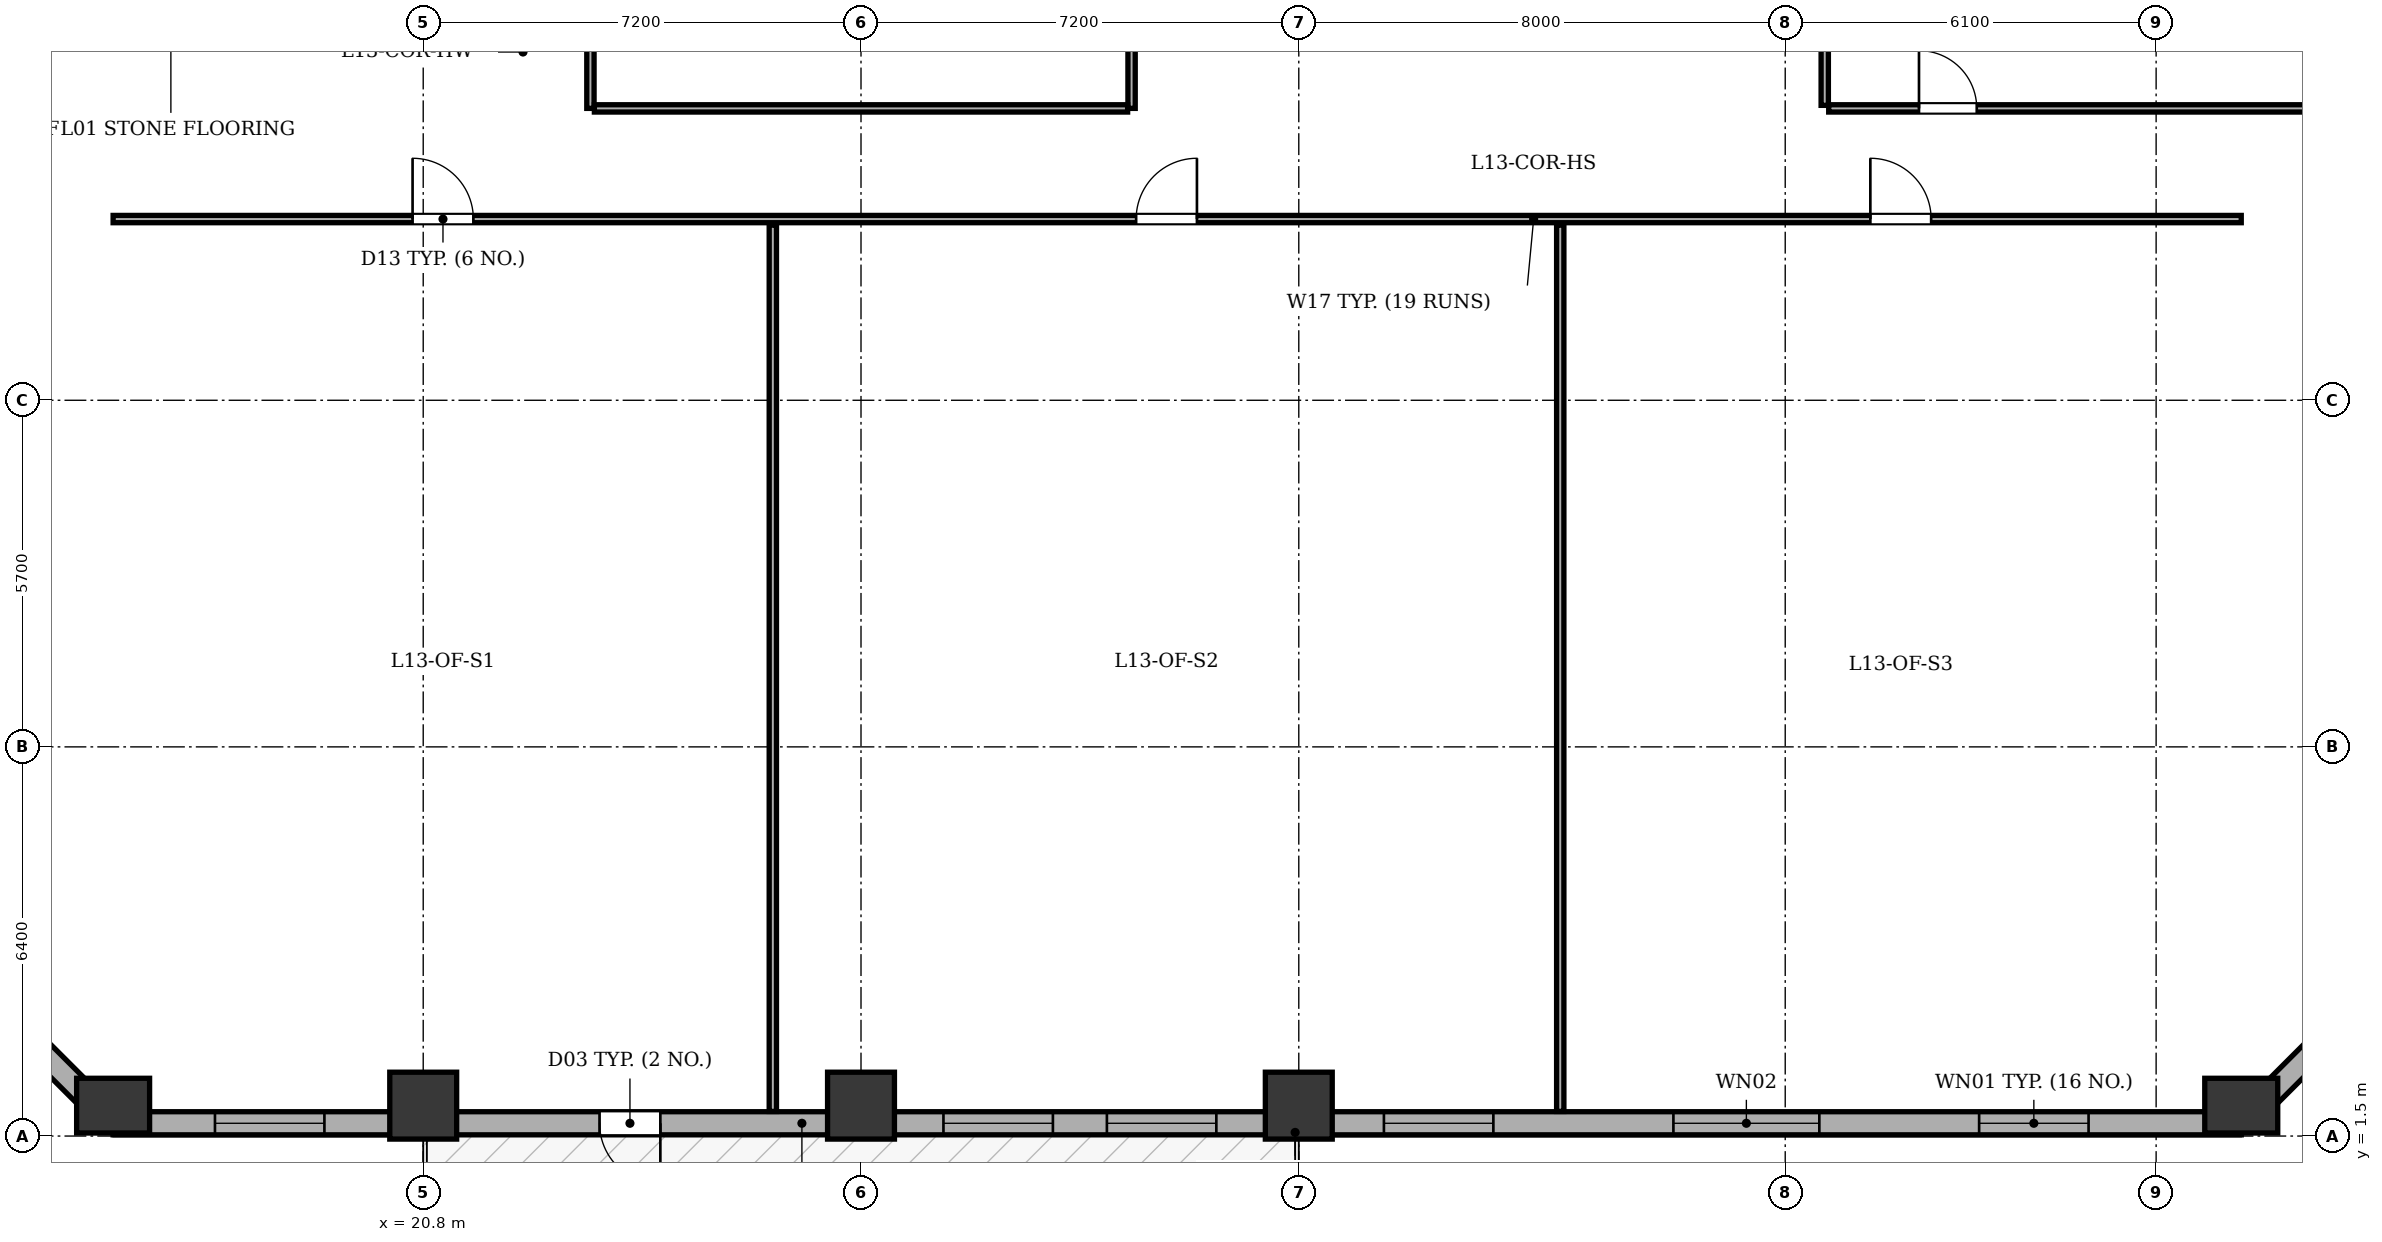
"""IFC4 building model, lengths in metres.
Left out: names, types, materials, properties, quantities, classifications, styles, units other than length and angle.
Written with IfcOpenShell. Run it as: python <this file> out.ifc"""

import sys

from ifc_helpers import new_model, si_unit, direction, frame, frame_2d, origin, origin_2d, place, context, subcontext, project, spatial, rectangle, extrude, element, fill, save


model = new_model("IFC4")
c1 = context("Model", 3, precision=1e-05, world=origin(), true_north=direction((0.0, 1.0)))
c2 = subcontext(c1, "Body", "Model", "MODEL_VIEW")
j1 = project(units=[si_unit("LENGTHUNIT", "METRE"), si_unit("PLANEANGLEUNIT", "RADIAN")], contexts=[c1])
p1 = place(None, origin())
s1 = spatial("IfcSite", under=j1, at=p1, CompositionType="ELEMENT")
p2 = place(p1, origin())
s2 = spatial("IfcBuilding", under=s1, at=p2, CompositionType="ELEMENT")
p3 = place(p2, frame((0.0, 0.0, 55.5)))
s3 = spatial("IfcBuildingStorey", under=s2, at=p3, CompositionType="ELEMENT", Elevation=55.5)
p4 = place(p3, frame((15.7, 2.0, 0.0), z_axis=(0.0, 0.0, 1.0), x_axis=(1.0, 0.0, 0.0)))
e1 = element("IfcColumn", 1, at=p4, inside=s3, PredefinedType="COLUMN", context=c2, shape_type="SweptSolid", body=[
    extrude(rectangle(XDim=0.9, YDim=1.2, at=origin_2d()), origin(), (0.0, 0.0, 1.0), 3.9),
])
for number, where, z_axis, x_axis in (
    (2, (20.8, 2.0, 0.0), (0.0, 0.0, 1.0), (1.0, 0.0, 0.0)),
    (3, (28.0, 2.0, 0.0), (0.0, 0.0, 1.0), (1.0, 0.0, 0.0)),
    (4, (35.2, 2.0, 0.0), (0.0, 0.0, 1.0), (1.0, 0.0, 0.0)),
):
    element("IfcColumn", number, at=place(p3, frame(where, z_axis=z_axis, x_axis=x_axis)), inside=s3, PredefinedType="COLUMN", context=c2, shape_type="SweptSolid", body=[
        extrude(rectangle(XDim=1.1, YDim=1.1, at=origin_2d()), origin(), (0.0, 0.0, 1.0), 3.9),
    ])
p5 = place(p3, frame((50.7, 2.0, 0.0), z_axis=(0.0, 0.0, 1.0), x_axis=(1.0, 0.0, 0.0)))
e5 = element("IfcColumn", 5, at=p5, inside=s3, PredefinedType="COLUMN", context=c2, shape_type="SweptSolid", body=[
    extrude(rectangle(XDim=0.9, YDim=1.2, at=origin_2d()), origin(), (0.0, 0.0, 1.0), 3.9),
])
p6 = place(p3, frame((50.7, 1.71, 0.0), z_axis=(0.0, 0.0, 1.0), x_axis=(-1.0, 0.0, 0.0)))
e6 = element("IfcWall", 6, at=p6, inside=s3, PredefinedType="STANDARD", context=c2, shape_type="SweptSolid", body=[
    extrude(rectangle(XDim=35.0, YDim=0.38, at=frame_2d((17.5, 0.0))), origin(), (0.0, 0.0, 1.0), 3.135),
])
p7 = place(p6, frame((26.0, 0.0, 0.0)))
e7 = element("IfcOpeningElement", 7, at=p7, cuts=e6, PredefinedType="OPENING", context=c2, shape_type="SweptSolid", body=[
    extrude(rectangle(XDim=1.0, YDim=2.02, at=frame_2d((0.5, 1.01))), frame((0.0, 0.2, 0.0), z_axis=(0.0, -1.0, 0.0), x_axis=(1.0, 0.0, 0.0)), (0.0, 0.0, 1.0), 0.4),
])
p8 = place(p6, frame((2.511, 0.0, 0.8)))
e8 = element("IfcOpeningElement", 8, at=p8, cuts=e6, PredefinedType="OPENING", context=c2, shape_type="SweptSolid", body=[
    extrude(rectangle(XDim=1.8, YDim=1.9, at=frame_2d((0.9, 0.95))), frame((0.0, 0.2, 0.0), z_axis=(0.0, -1.0, 0.0), x_axis=(1.0, 0.0, 0.0)), (0.0, 0.0, 1.0), 0.4),
])
p9 = place(p6, frame((6.939, 0.0, 0.8)))
e9 = element("IfcOpeningElement", 9, at=p9, cuts=e6, PredefinedType="OPENING", context=c2, shape_type="SweptSolid", body=[
    extrude(rectangle(XDim=2.4, YDim=1.9, at=frame_2d((1.2, 0.95))), frame((0.0, 0.2, 0.0), z_axis=(0.0, -1.0, 0.0), x_axis=(1.0, 0.0, 0.0)), (0.0, 0.0, 1.0), 0.4),
])
p10 = place(p6, frame((12.3, 0.0, 0.8)))
e10 = element("IfcOpeningElement", 10, at=p10, cuts=e6, PredefinedType="OPENING", context=c2, shape_type="SweptSolid", body=[
    extrude(rectangle(XDim=1.8, YDim=1.9, at=frame_2d((0.9, 0.95))), frame((0.0, 0.2, 0.0), z_axis=(0.0, -1.0, 0.0), x_axis=(1.0, 0.0, 0.0)), (0.0, 0.0, 1.0), 0.4),
])
p11 = place(p6, frame((16.856, 0.0, 0.8)))
e11 = element("IfcOpeningElement", 11, at=p11, cuts=e6, PredefinedType="OPENING", context=c2, shape_type="SweptSolid", body=[
    extrude(rectangle(XDim=1.8, YDim=1.9, at=frame_2d((0.9, 0.95))), frame((0.0, 0.2, 0.0), z_axis=(0.0, -1.0, 0.0), x_axis=(1.0, 0.0, 0.0)), (0.0, 0.0, 1.0), 0.4),
])
p12 = place(p6, frame((19.544, 0.0, 0.8)))
e12 = element("IfcOpeningElement", 12, at=p12, cuts=e6, PredefinedType="OPENING", context=c2, shape_type="SweptSolid", body=[
    extrude(rectangle(XDim=1.8, YDim=1.9, at=frame_2d((0.9, 0.95))), frame((0.0, 0.2, 0.0), z_axis=(0.0, -1.0, 0.0), x_axis=(1.0, 0.0, 0.0)), (0.0, 0.0, 1.0), 0.4),
])
p13 = place(p6, frame((31.525, 0.0, 0.8)))
e13 = element("IfcOpeningElement", 13, at=p13, cuts=e6, PredefinedType="OPENING", context=c2, shape_type="SweptSolid", body=[
    extrude(rectangle(XDim=1.8, YDim=1.9, at=frame_2d((0.9, 0.95))), frame((0.0, 0.2, 0.0), z_axis=(0.0, -1.0, 0.0), x_axis=(1.0, 0.0, 0.0)), (0.0, 0.0, 1.0), 0.4),
])
p14 = place(p3, frame((15.7, 1.71, 0.0), z_axis=(0.0, 0.0, 1.0), x_axis=(-0.707106781187, 0.707106781187, 0.0)))
e14 = element("IfcWall", 14, at=p14, inside=s3, PredefinedType="STANDARD", context=c2, shape_type="SweptSolid", body=[
    extrude(rectangle(XDim=6.774, YDim=0.38, at=frame_2d((3.387, 0.0))), origin(), (0.0, 0.0, 1.0), 3.135),
])
p15 = place(p14, frame((2.687, 0.0, 0.8)))
e15 = element("IfcOpeningElement", 15, at=p15, cuts=e14, PredefinedType="OPENING", context=c2, shape_type="SweptSolid", body=[
    extrude(rectangle(XDim=1.4, YDim=1.65, at=frame_2d((0.7, 0.825))), frame((0.0, 0.2, 0.0), z_axis=(0.0, -1.0, 0.0), x_axis=(1.0, 0.0, 0.0)), (0.0, 0.0, 1.0), 0.4),
])
p16 = place(p3, frame((55.49, 6.5, 0.0), z_axis=(0.0, 0.0, 1.0), x_axis=(-0.707106781187, -0.707106781187, 0.0)))
e16 = element("IfcWall", 16, at=p16, inside=s3, PredefinedType="STANDARD", context=c2, shape_type="SweptSolid", body=[
    extrude(rectangle(XDim=6.774, YDim=0.38, at=frame_2d((3.387, 0.0))), origin(), (0.0, 0.0, 1.0), 3.135),
])
p17 = place(p16, frame((2.687, 0.0, 0.8)))
e17 = element("IfcOpeningElement", 17, at=p17, cuts=e16, PredefinedType="OPENING", context=c2, shape_type="SweptSolid", body=[
    extrude(rectangle(XDim=1.4, YDim=1.65, at=frame_2d((0.7, 0.825))), frame((0.0, 0.2, 0.0), z_axis=(0.0, -1.0, 0.0), x_axis=(1.0, 0.0, 0.0)), (0.0, 0.0, 1.0), 0.4),
])
for number, where, z_axis, x_axis in (
    (18, (23.55, 18.4, 0.0), (0.0, 0.0, 1.0), (0.0, 1.0, 0.0)),
    (19, (32.45, 18.4, 0.0), (0.0, 0.0, 1.0), (0.0, 1.0, 0.0)),
):
    element("IfcWall", number, at=place(p3, frame(where, z_axis=z_axis, x_axis=x_axis)), inside=s3, PredefinedType="PARTITIONING", context=c2, shape_type="SweptSolid", body=[
        extrude(rectangle(XDim=3.485, YDim=0.12, at=frame_2d((1.743, 0.0))), origin(), (0.0, 0.0, 1.0), 3.6),
    ])
p18 = place(p3, frame((23.615, 18.4, 0.0), z_axis=(0.0, 0.0, 1.0), x_axis=(1.0, 0.0, 0.0)))
e20 = element("IfcWall", 20, at=p18, inside=s3, PredefinedType="PARTITIONING", context=c2, shape_type="SweptSolid", body=[
    extrude(rectangle(XDim=8.77, YDim=0.12, at=frame_2d((4.385, 0.0))), origin(), (0.0, 0.0, 1.0), 3.6),
])
p19 = place(p3, frame((15.7, 16.58, 0.0), z_axis=(0.0, 0.0, 1.0), x_axis=(1.0, 0.0, 0.0)))
e21 = element("IfcWall", 21, at=p19, inside=s3, PredefinedType="PARTITIONING", context=c2, shape_type="SweptSolid", body=[
    extrude(rectangle(XDim=35.0, YDim=0.12, at=frame_2d((17.5, 0.0))), origin(), (0.0, 0.0, 1.0), 3.6),
])
p20 = place(p19, frame((4.925, 0.0, 0.0)))
e22 = element("IfcOpeningElement", 22, at=p20, cuts=e21, PredefinedType="OPENING", context=c2, shape_type="SweptSolid", body=[
    extrude(rectangle(XDim=1.0, YDim=2.1, at=frame_2d((0.5, 1.05))), frame((0.0, 0.07, 0.0), z_axis=(0.0, -1.0, 0.0), x_axis=(1.0, 0.0, 0.0)), (0.0, 0.0, 1.0), 0.14),
])
p21 = place(p19, frame((16.825, 0.0, 0.0)))
e23 = element("IfcOpeningElement", 23, at=p21, cuts=e21, PredefinedType="OPENING", context=c2, shape_type="SweptSolid", body=[
    extrude(rectangle(XDim=1.0, YDim=2.1, at=frame_2d((0.5, 1.05))), frame((0.0, 0.07, 0.0), z_axis=(0.0, -1.0, 0.0), x_axis=(1.0, 0.0, 0.0)), (0.0, 0.0, 1.0), 0.14),
])
p22 = place(p19, frame((28.9, 0.0, 0.0)))
e24 = element("IfcOpeningElement", 24, at=p22, cuts=e21, PredefinedType="OPENING", context=c2, shape_type="SweptSolid", body=[
    extrude(rectangle(XDim=1.0, YDim=2.1, at=frame_2d((0.5, 1.05))), frame((0.0, 0.07, 0.0), z_axis=(0.0, -1.0, 0.0), x_axis=(1.0, 0.0, 0.0)), (0.0, 0.0, 1.0), 0.14),
])
for number, where, z_axis, x_axis in (
    (25, (26.55, 1.905, 0.0), (0.0, 0.0, 1.0), (0.0, 1.0, 0.0)),
    (26, (39.5, 1.905, 0.0), (0.0, 0.0, 1.0), (0.0, 1.0, 0.0)),
):
    element("IfcWall", number, at=place(p3, frame(where, z_axis=z_axis, x_axis=x_axis)), inside=s3, PredefinedType="PARTITIONING", context=c2, shape_type="SweptSolid", body=[
        extrude(rectangle(XDim=14.575, YDim=0.12, at=frame_2d((7.288, 0.0))), origin(), (0.0, 0.0, 1.0), 3.6),
    ])
p23 = place(p3, frame((43.85, 18.45, 0.0), z_axis=(0.0, 0.0, 1.0), x_axis=(0.0, 1.0, 0.0)))
e27 = element("IfcWall", 27, at=p23, inside=s3, PredefinedType="PARTITIONING", context=c2, shape_type="SweptSolid", body=[
    extrude(rectangle(XDim=17.5, YDim=0.12, at=frame_2d((8.75, 0.0))), origin(), (0.0, 0.0, 1.0), 3.6),
])
p24 = place(p3, frame((43.915, 18.4, 0.0), z_axis=(0.0, 0.0, 1.0), x_axis=(1.0, 0.0, 0.0)))
e28 = element("IfcWall", 28, at=p24, inside=s3, PredefinedType="PARTITIONING", context=c2, shape_type="SweptSolid", body=[
    extrude(rectangle(XDim=11.38, YDim=0.12, at=frame_2d((5.69, 0.0))), origin(), (0.0, 0.0, 1.0), 3.6),
])
p25 = place(p24, frame((1.485, 0.0, 0.0)))
e29 = element("IfcOpeningElement", 29, at=p25, cuts=e28, PredefinedType="OPENING", context=c2, shape_type="SweptSolid", body=[
    extrude(rectangle(XDim=0.95, YDim=2.1, at=frame_2d((0.475, 1.05))), frame((0.0, 0.07, 0.0), z_axis=(0.0, -1.0, 0.0), x_axis=(1.0, 0.0, 0.0)), (0.0, 0.0, 1.0), 0.14),
])
p26 = place(p7, origin())
e30 = element("IfcDoor", 30, at=p26, inside=s3, OperationType="SINGLE_SWING_LEFT", PredefinedType="DOOR", context=c2, shape_type="SweptSolid", body=[
    extrude(rectangle(XDim=1.0, YDim=2.02, at=frame_2d((0.5, 1.01))), frame((0.0, 0.025, 0.0), z_axis=(0.0, -1.0, 0.0), x_axis=(1.0, 0.0, 0.0)), (0.0, 0.0, 1.0), 0.05),
])
fill(e7, e30)
p27 = place(p8, origin())
e31 = element("IfcWindow", 31, at=p27, inside=s3, PartitioningType="SINGLE_PANEL", PredefinedType="WINDOW", context=c2, shape_type="SweptSolid", body=[
    extrude(rectangle(XDim=1.8, YDim=1.9, at=frame_2d((0.9, 0.95))), frame((0.0, -0.01, 0.0), z_axis=(0.0, -1.0, 0.0), x_axis=(1.0, 0.0, 0.0)), (0.0, 0.0, 1.0), 0.06),
])
fill(e8, e31)
p28 = place(p9, origin())
e32 = element("IfcWindow", 32, at=p28, inside=s3, PartitioningType="SINGLE_PANEL", PredefinedType="WINDOW", context=c2, shape_type="SweptSolid", body=[
    extrude(rectangle(XDim=2.4, YDim=1.9, at=frame_2d((1.2, 0.95))), frame((0.0, -0.01, 0.0), z_axis=(0.0, -1.0, 0.0), x_axis=(1.0, 0.0, 0.0)), (0.0, 0.0, 1.0), 0.06),
])
fill(e9, e32)
p29 = place(p10, origin())
e33 = element("IfcWindow", 33, at=p29, inside=s3, PartitioningType="SINGLE_PANEL", PredefinedType="WINDOW", context=c2, shape_type="SweptSolid", body=[
    extrude(rectangle(XDim=1.8, YDim=1.9, at=frame_2d((0.9, 0.95))), frame((0.0, -0.01, 0.0), z_axis=(0.0, -1.0, 0.0), x_axis=(1.0, 0.0, 0.0)), (0.0, 0.0, 1.0), 0.06),
])
fill(e10, e33)
p30 = place(p11, origin())
e34 = element("IfcWindow", 34, at=p30, inside=s3, PartitioningType="SINGLE_PANEL", PredefinedType="WINDOW", context=c2, shape_type="SweptSolid", body=[
    extrude(rectangle(XDim=1.8, YDim=1.9, at=frame_2d((0.9, 0.95))), frame((0.0, -0.01, 0.0), z_axis=(0.0, -1.0, 0.0), x_axis=(1.0, 0.0, 0.0)), (0.0, 0.0, 1.0), 0.06),
])
fill(e11, e34)
p31 = place(p12, origin())
e35 = element("IfcWindow", 35, at=p31, inside=s3, PartitioningType="SINGLE_PANEL", PredefinedType="WINDOW", context=c2, shape_type="SweptSolid", body=[
    extrude(rectangle(XDim=1.8, YDim=1.9, at=frame_2d((0.9, 0.95))), frame((0.0, -0.01, 0.0), z_axis=(0.0, -1.0, 0.0), x_axis=(1.0, 0.0, 0.0)), (0.0, 0.0, 1.0), 0.06),
])
fill(e12, e35)
p32 = place(p13, origin())
e36 = element("IfcWindow", 36, at=p32, inside=s3, PartitioningType="SINGLE_PANEL", PredefinedType="WINDOW", context=c2, shape_type="SweptSolid", body=[
    extrude(rectangle(XDim=1.8, YDim=1.9, at=frame_2d((0.9, 0.95))), frame((0.0, -0.01, 0.0), z_axis=(0.0, -1.0, 0.0), x_axis=(1.0, 0.0, 0.0)), (0.0, 0.0, 1.0), 0.06),
])
fill(e13, e36)
p33 = place(p20, origin())
e37 = element("IfcDoor", 37, at=p33, inside=s3, OperationType="SINGLE_SWING_LEFT", PredefinedType="DOOR", context=c2, shape_type="SweptSolid", body=[
    extrude(rectangle(XDim=1.0, YDim=2.1, at=frame_2d((0.5, 1.05))), frame((0.0, 0.025, 0.0), z_axis=(0.0, -1.0, 0.0), x_axis=(1.0, 0.0, 0.0)), (0.0, 0.0, 1.0), 0.05),
])
fill(e22, e37)
p34 = place(p21, origin())
e38 = element("IfcDoor", 38, at=p34, inside=s3, OperationType="SINGLE_SWING_RIGHT", PredefinedType="DOOR", context=c2, shape_type="SweptSolid", body=[
    extrude(rectangle(XDim=1.0, YDim=2.1, at=frame_2d((0.5, 1.05))), frame((0.0, 0.025, 0.0), z_axis=(0.0, -1.0, 0.0), x_axis=(1.0, 0.0, 0.0)), (0.0, 0.0, 1.0), 0.05),
])
fill(e23, e38)
p35 = place(p22, origin())
e39 = element("IfcDoor", 39, at=p35, inside=s3, OperationType="SINGLE_SWING_LEFT", PredefinedType="DOOR", context=c2, shape_type="SweptSolid", body=[
    extrude(rectangle(XDim=1.0, YDim=2.1, at=frame_2d((0.5, 1.05))), frame((0.0, 0.025, 0.0), z_axis=(0.0, -1.0, 0.0), x_axis=(1.0, 0.0, 0.0)), (0.0, 0.0, 1.0), 0.05),
])
fill(e24, e39)
p36 = place(p25, origin())
e40 = element("IfcDoor", 40, at=p36, inside=s3, OperationType="SINGLE_SWING_LEFT", PredefinedType="DOOR", context=c2, shape_type="SweptSolid", body=[
    extrude(rectangle(XDim=0.95, YDim=2.1, at=frame_2d((0.475, 1.05))), frame((0.0, 0.025, 0.0), z_axis=(0.0, -1.0, 0.0), x_axis=(1.0, 0.0, 0.0)), (0.0, 0.0, 1.0), 0.05),
])
fill(e29, e40)
save(model, sys.argv[1])
